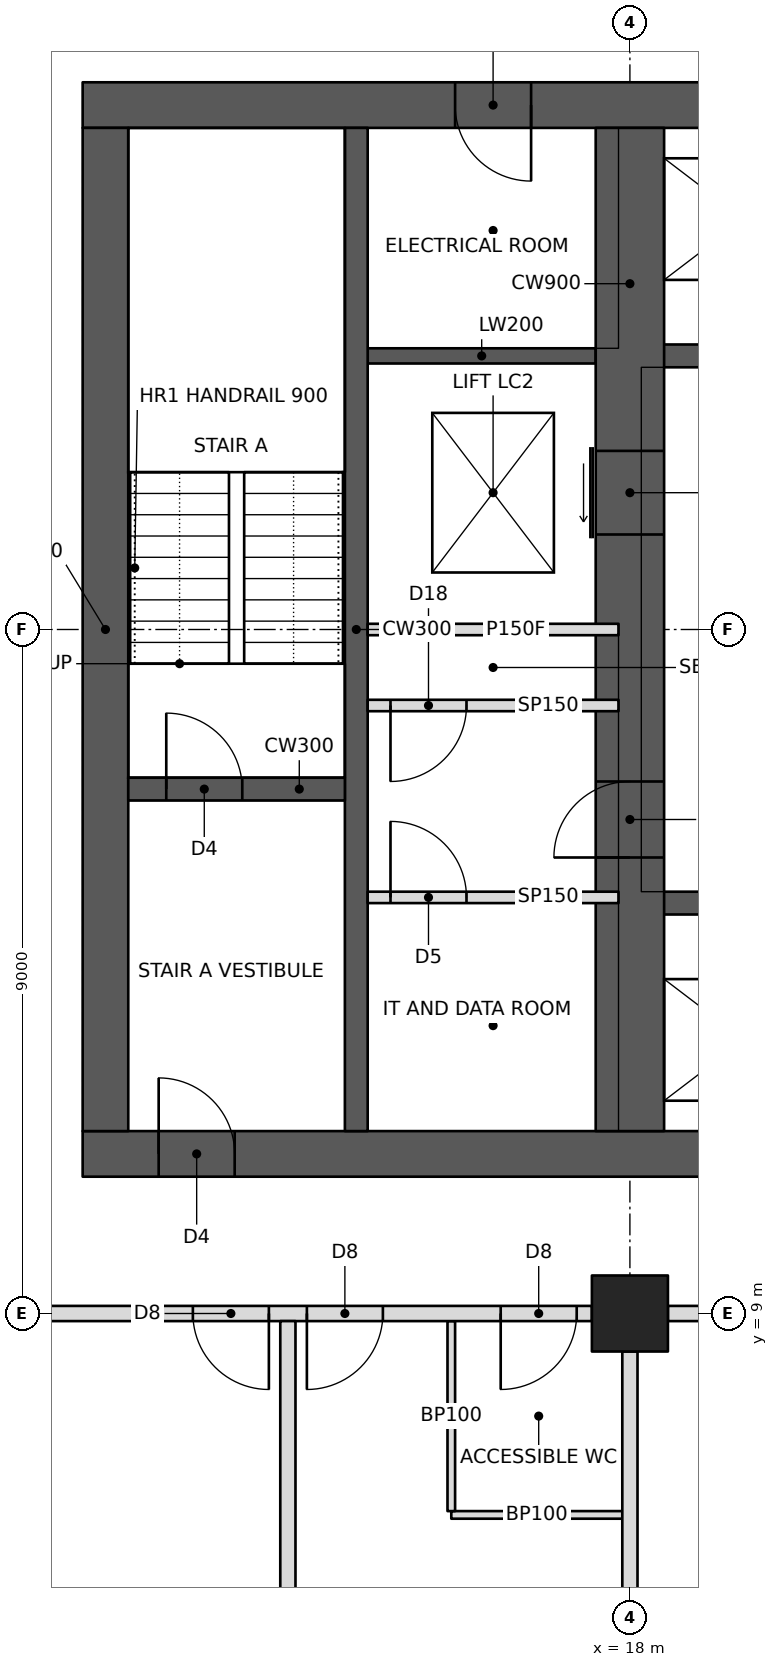
"""IFC4 building model, lengths in metres.
Left out: names, types, materials, properties, quantities, classifications, styles, units other than length and angle.
Written with IfcOpenShell. Run it as: python <this file> out.ifc"""

import sys

from ifc_helpers import new_model, si_unit, direction, frame, frame_2d, origin, origin_2d, place, context, subcontext, project, spatial, rectangle, hollow_rectangle, extrude, element, fill, save


model = new_model("IFC4")
c1 = context("Model", 3, precision=1e-05, world=origin(), true_north=direction((0.0, 1.0)))
c2 = subcontext(c1, "Body", "Model", "MODEL_VIEW")
j1 = project(units=[si_unit("LENGTHUNIT", "METRE"), si_unit("PLANEANGLEUNIT", "RADIAN")], contexts=[c1])
p1 = place(None, origin())
s1 = spatial("IfcSite", under=j1, at=p1, CompositionType="ELEMENT")
p2 = place(p1, origin())
s2 = spatial("IfcBuilding", under=s1, at=p2, CompositionType="ELEMENT")
p3 = place(p2, frame((0.0, 0.0, 160.4)))
s3 = spatial("IfcBuildingStorey", under=s2, at=p3, CompositionType="ELEMENT", Elevation=160.4)
p4 = place(p3, frame((18.0, 9.0, 0.0), z_axis=(0.0, 0.0, 1.0), x_axis=(1.0, 0.0, 0.0)))
e1 = element("IfcColumn", 1, at=p4, inside=s3, PredefinedType="COLUMN", context=c2, shape_type="SweptSolid", body=[
    extrude(hollow_rectangle(XDim=1.0, YDim=1.0, WallThickness=0.1, at=origin_2d()), origin(), (0.0, 0.0, 1.0), 3.4),
])
p5 = place(p3, frame((10.8, 11.1, 0.0), z_axis=(0.0, 0.0, 1.0), x_axis=(1.0, 0.0, 0.0)))
e2 = element("IfcWall", 2, at=p5, inside=s3, PredefinedType="SHEAR", context=c2, shape_type="SweptSolid", body=[
    extrude(rectangle(XDim=23.4, YDim=0.6, at=frame_2d((11.7, 0.0))), origin(), (0.0, 0.0, 1.0), 3.4),
])
p6 = place(p5, frame((1.0, 0.0, 0.0)))
e3 = element("IfcOpeningElement", 3, at=p6, cuts=e2, PredefinedType="OPENING", context=c2, shape_type="SweptSolid", body=[
    extrude(rectangle(XDim=1.0, YDim=2.1, at=frame_2d((0.5, 1.05))), frame((0.0, 0.31, 0.0), z_axis=(0.0, -1.0, 0.0), x_axis=(1.0, 0.0, 0.0)), (0.0, 0.0, 1.0), 0.62),
])
p7 = place(p5, frame((17.2, 0.0, 0.0)))
e4 = element("IfcOpeningElement", 4, at=p7, cuts=e2, PredefinedType="OPENING", context=c2, shape_type="SweptSolid", body=[
    extrude(rectangle(XDim=1.8, YDim=2.1, at=frame_2d((0.9, 1.05))), frame((0.0, 0.31, 0.0), z_axis=(0.0, -1.0, 0.0), x_axis=(1.0, 0.0, 0.0)), (0.0, 0.0, 1.0), 0.62),
])
p8 = place(p3, frame((10.8, 24.9, 0.0), z_axis=(0.0, 0.0, 1.0), x_axis=(1.0, 0.0, 0.0)))
e5 = element("IfcWall", 5, at=p8, inside=s3, PredefinedType="SHEAR", context=c2, shape_type="SweptSolid", body=[
    extrude(rectangle(XDim=23.4, YDim=0.6, at=frame_2d((11.7, 0.0))), origin(), (0.0, 0.0, 1.0), 3.4),
])
p9 = place(p8, frame((17.2, 0.0, 0.0)))
e6 = element("IfcOpeningElement", 6, at=p9, cuts=e5, PredefinedType="OPENING", context=c2, shape_type="SweptSolid", body=[
    extrude(rectangle(XDim=1.8, YDim=2.1, at=frame_2d((0.9, 1.05))), frame((0.0, 0.31, 0.0), z_axis=(0.0, -1.0, 0.0), x_axis=(1.0, 0.0, 0.0)), (0.0, 0.0, 1.0), 0.62),
])
p10 = place(p8, frame((21.1, 0.0, 0.0)))
e7 = element("IfcOpeningElement", 7, at=p10, cuts=e5, PredefinedType="OPENING", context=c2, shape_type="SweptSolid", body=[
    extrude(rectangle(XDim=1.0, YDim=2.1, at=frame_2d((0.5, 1.05))), frame((0.0, 0.31, 0.0), z_axis=(0.0, -1.0, 0.0), x_axis=(1.0, 0.0, 0.0)), (0.0, 0.0, 1.0), 0.62),
])
p11 = place(p8, frame((4.9, 0.0, 0.0)))
e8 = element("IfcOpeningElement", 8, at=p11, cuts=e5, PredefinedType="OPENING", context=c2, shape_type="SweptSolid", body=[
    extrude(rectangle(XDim=1.0, YDim=2.1, at=frame_2d((0.5, 1.05))), frame((0.0, 0.31, 0.0), z_axis=(0.0, -1.0, 0.0), x_axis=(1.0, 0.0, 0.0)), (0.0, 0.0, 1.0), 0.62),
])
p12 = place(p3, frame((11.1, 11.4, 0.0), z_axis=(0.0, 0.0, 1.0), x_axis=(0.0, 1.0, 0.0)))
e9 = element("IfcWall", 9, at=p12, inside=s3, PredefinedType="SHEAR", context=c2, shape_type="SweptSolid", body=[
    extrude(rectangle(XDim=13.2, YDim=0.6, at=frame_2d((6.6, 0.0))), origin(), (0.0, 0.0, 1.0), 3.4),
])
p13 = place(p3, frame((14.4, 11.4, 0.0), z_axis=(0.0, 0.0, 1.0), x_axis=(0.0, 1.0, 0.0)))
e10 = element("IfcWall", 10, at=p13, inside=s3, PredefinedType="SHEAR", context=c2, shape_type="SweptSolid", body=[
    extrude(rectangle(XDim=13.2, YDim=0.3, at=frame_2d((6.6, 0.0))), origin(), (0.0, 0.0, 1.0), 3.4),
])
p14 = place(p3, frame((11.4, 15.9, 0.0), z_axis=(0.0, 0.0, 1.0), x_axis=(1.0, 0.0, 0.0)))
e11 = element("IfcWall", 11, at=p14, inside=s3, PredefinedType="SHEAR", context=c2, shape_type="SweptSolid", body=[
    extrude(rectangle(XDim=2.85, YDim=0.3, at=frame_2d((1.425, 0.0))), origin(), (0.0, 0.0, 1.0), 3.4),
])
p15 = place(p14, frame((0.5, 0.0, 0.0)))
e12 = element("IfcOpeningElement", 12, at=p15, cuts=e11, PredefinedType="OPENING", context=c2, shape_type="SweptSolid", body=[
    extrude(rectangle(XDim=1.0, YDim=2.1, at=frame_2d((0.5, 1.05))), frame((0.0, 0.16, 0.0), z_axis=(0.0, -1.0, 0.0), x_axis=(1.0, 0.0, 0.0)), (0.0, 0.0, 1.0), 0.32),
])
p16 = place(p3, frame((18.0, 11.4, 0.0), z_axis=(0.0, 0.0, 1.0), x_axis=(0.0, 1.0, 0.0)))
e13 = element("IfcWall", 13, at=p16, inside=s3, PredefinedType="SHEAR", context=c2, shape_type="SweptSolid", body=[
    extrude(rectangle(XDim=13.2, YDim=0.9, at=frame_2d((6.6, 0.0))), origin(), (0.0, 0.0, 1.0), 3.4),
])
p17 = place(p16, frame((3.6, 0.0, 0.0)))
e14 = element("IfcOpeningElement", 14, at=p17, cuts=e13, PredefinedType="OPENING", context=c2, shape_type="SweptSolid", body=[
    extrude(rectangle(XDim=1.0, YDim=2.1, at=frame_2d((0.5, 1.05))), frame((0.0, 0.46, 0.0), z_axis=(0.0, -1.0, 0.0), x_axis=(1.0, 0.0, 0.0)), (0.0, 0.0, 1.0), 0.92),
])
p18 = place(p16, frame((7.85, 0.0, 0.0)))
e15 = element("IfcOpeningElement", 15, at=p18, cuts=e13, PredefinedType="OPENING", context=c2, shape_type="SweptSolid", body=[
    extrude(rectangle(XDim=1.1, YDim=2.1, at=frame_2d((0.55, 1.05))), frame((0.0, 0.46, 0.0), z_axis=(0.0, -1.0, 0.0), x_axis=(1.0, 0.0, 0.0)), (0.0, 0.0, 1.0), 0.92),
])
p19 = place(p3, frame((14.55, 18.0, 0.0), z_axis=(0.0, 0.0, 1.0), x_axis=(1.0, 0.0, 0.0)))
e16 = element("IfcWall", 16, at=p19, inside=s3, PredefinedType="PARTITIONING", context=c2, shape_type="SweptSolid", body=[
    extrude(rectangle(XDim=3.3, YDim=0.15, at=frame_2d((1.65, 0.0))), origin(), (0.0, 0.0, 1.0), 3.2),
])
p20 = place(p3, frame((18.15, 14.4, 0.0), z_axis=(0.0, 0.0, 1.0), x_axis=(1.0, 0.0, 0.0)))
e17 = element("IfcWall", 17, at=p20, inside=s3, PredefinedType="SHEAR", context=c2, shape_type="SweptSolid", body=[
    extrude(rectangle(XDim=9.0, YDim=0.3, at=frame_2d((4.5, 0.0))), origin(), (0.0, 0.0, 1.0), 3.4),
])
p21 = place(p20, frame((0.8, 0.0, 0.0)))
e18 = element("IfcOpeningElement", 18, at=p21, cuts=e17, PredefinedType="OPENING", context=c2, shape_type="SweptSolid", body=[
    extrude(rectangle(XDim=1.1, YDim=2.1, at=frame_2d((0.55, 1.05))), frame((0.0, 0.16, 0.0), z_axis=(0.0, -1.0, 0.0), x_axis=(1.0, 0.0, 0.0)), (0.0, 0.0, 1.0), 0.32),
])
p22 = place(p20, frame((6.75, 0.0, 0.0)))
e19 = element("IfcOpeningElement", 19, at=p22, cuts=e17, PredefinedType="OPENING", context=c2, shape_type="SweptSolid", body=[
    extrude(rectangle(XDim=1.2, YDim=2.1, at=frame_2d((0.6, 1.05))), frame((0.0, 0.16, 0.0), z_axis=(0.0, -1.0, 0.0), x_axis=(1.0, 0.0, 0.0)), (0.0, 0.0, 1.0), 0.32),
])
p23 = place(p20, frame((3.8, 0.0, 0.0)))
e20 = element("IfcOpeningElement", 20, at=p23, cuts=e17, PredefinedType="OPENING", context=c2, shape_type="SweptSolid", body=[
    extrude(rectangle(XDim=1.1, YDim=2.1, at=frame_2d((0.55, 1.05))), frame((0.0, 0.16, 0.0), z_axis=(0.0, -1.0, 0.0), x_axis=(1.0, 0.0, 0.0)), (0.0, 0.0, 1.0), 0.32),
])
p24 = place(p3, frame((18.15, 21.6, 0.0), z_axis=(0.0, 0.0, 1.0), x_axis=(1.0, 0.0, 0.0)))
e21 = element("IfcWall", 21, at=p24, inside=s3, PredefinedType="SHEAR", context=c2, shape_type="SweptSolid", body=[
    extrude(rectangle(XDim=9.0, YDim=0.3, at=frame_2d((4.5, 0.0))), origin(), (0.0, 0.0, 1.0), 3.4),
])
p25 = place(p24, frame((0.8, 0.0, 0.0)))
e22 = element("IfcOpeningElement", 22, at=p25, cuts=e21, PredefinedType="OPENING", context=c2, shape_type="SweptSolid", body=[
    extrude(rectangle(XDim=1.1, YDim=2.1, at=frame_2d((0.55, 1.05))), frame((0.0, 0.16, 0.0), z_axis=(0.0, -1.0, 0.0), x_axis=(1.0, 0.0, 0.0)), (0.0, 0.0, 1.0), 0.32),
])
p26 = place(p24, frame((3.8, 0.0, 0.0)))
e23 = element("IfcOpeningElement", 23, at=p26, cuts=e21, PredefinedType="OPENING", context=c2, shape_type="SweptSolid", body=[
    extrude(rectangle(XDim=1.1, YDim=2.1, at=frame_2d((0.55, 1.05))), frame((0.0, 0.16, 0.0), z_axis=(0.0, -1.0, 0.0), x_axis=(1.0, 0.0, 0.0)), (0.0, 0.0, 1.0), 0.32),
])
p27 = place(p24, frame((6.75, 0.0, 0.0)))
e24 = element("IfcOpeningElement", 24, at=p27, cuts=e21, PredefinedType="OPENING", context=c2, shape_type="SweptSolid", body=[
    extrude(rectangle(XDim=1.2, YDim=2.1, at=frame_2d((0.6, 1.05))), frame((0.0, 0.16, 0.0), z_axis=(0.0, -1.0, 0.0), x_axis=(1.0, 0.0, 0.0)), (0.0, 0.0, 1.0), 0.32),
])
p28 = place(p3, frame((14.55, 21.6, 0.0), z_axis=(0.0, 0.0, 1.0), x_axis=(1.0, 0.0, 0.0)))
e25 = element("IfcWall", 25, at=p28, inside=s3, PredefinedType="SHEAR", context=c2, shape_type="SweptSolid", body=[
    extrude(rectangle(XDim=3.0, YDim=0.2, at=frame_2d((1.5, 0.0))), origin(), (0.0, 0.0, 1.0), 3.4),
])
p29 = place(p3, frame((9.5, 9.0, 0.0), z_axis=(0.0, 0.0, 1.0), x_axis=(1.0, 0.0, 0.0)))
e26 = element("IfcWall", 26, at=p29, inside=s3, PredefinedType="PARTITIONING", context=c2, shape_type="SweptSolid", body=[
    extrude(rectangle(XDim=8.0, YDim=0.2, at=frame_2d((4.0, 0.0))), origin(), (0.0, 0.0, 1.0), 2.405),
])
p30 = place(p29, frame((2.75, 0.0, 0.0)))
e27 = element("IfcOpeningElement", 27, at=p30, cuts=e26, PredefinedType="OPENING", context=c2, shape_type="SweptSolid", body=[
    extrude(rectangle(XDim=1.0, YDim=2.1, at=frame_2d((0.5, 1.05))), frame((0.0, 0.11, 0.0), z_axis=(0.0, -1.0, 0.0), x_axis=(1.0, 0.0, 0.0)), (0.0, 0.0, 1.0), 0.22),
])
p31 = place(p29, frame((6.8, 0.0, 0.0)))
e28 = element("IfcOpeningElement", 28, at=p31, cuts=e26, PredefinedType="OPENING", context=c2, shape_type="SweptSolid", body=[
    extrude(rectangle(XDim=1.0, YDim=2.1, at=frame_2d((0.5, 1.05))), frame((0.0, 0.11, 0.0), z_axis=(0.0, -1.0, 0.0), x_axis=(1.0, 0.0, 0.0)), (0.0, 0.0, 1.0), 0.22),
])
p32 = place(p29, frame((4.25, 0.0, 0.0)))
e29 = element("IfcOpeningElement", 29, at=p32, cuts=e26, PredefinedType="OPENING", context=c2, shape_type="SweptSolid", body=[
    extrude(rectangle(XDim=1.0, YDim=2.1, at=frame_2d((0.5, 1.05))), frame((0.0, 0.11, 0.0), z_axis=(0.0, -1.0, 0.0), x_axis=(1.0, 0.0, 0.0)), (0.0, 0.0, 1.0), 0.22),
])
p33 = place(p3, frame((18.5, 9.0, 0.0), z_axis=(0.0, 0.0, 1.0), x_axis=(1.0, 0.0, 0.0)))
e30 = element("IfcWall", 30, at=p33, inside=s3, PredefinedType="PARTITIONING", context=c2, shape_type="SweptSolid", body=[
    extrude(rectangle(XDim=2.85, YDim=0.2, at=frame_2d((1.425, 0.0))), origin(), (0.0, 0.0, 1.0), 2.405),
])
p34 = place(p3, frame((18.0, 8.5, 0.0), z_axis=(0.0, 0.0, 1.0), x_axis=(0.0, -1.0, 0.0)))
e31 = element("IfcWall", 31, at=p34, inside=s3, PredefinedType="PARTITIONING", context=c2, shape_type="SweptSolid", body=[
    extrude(rectangle(XDim=7.5, YDim=0.2, at=frame_2d((3.75, 0.0))), origin(), (0.0, 0.0, 1.0), 2.405),
])
p35 = place(p3, frame((13.5, 8.9, 0.0), z_axis=(0.0, 0.0, 1.0), x_axis=(0.0, -1.0, 0.0)))
e32 = element("IfcWall", 32, at=p35, inside=s3, PredefinedType="PARTITIONING", context=c2, shape_type="SweptSolid", body=[
    extrude(rectangle(XDim=7.9, YDim=0.2, at=frame_2d((3.95, 0.0))), origin(), (0.0, 0.0, 1.0), 2.404),
])
p36 = place(p3, frame((15.65, 6.35, 0.0), z_axis=(0.0, 0.0, 1.0), x_axis=(1.0, 0.0, 0.0)))
e33 = element("IfcWall", 33, at=p36, inside=s3, PredefinedType="PARTITIONING", context=c2, shape_type="SweptSolid", body=[
    extrude(rectangle(XDim=2.25, YDim=0.1, at=frame_2d((1.125, 0.0))), origin(), (0.0, 0.0, 1.0), 2.404),
])
p37 = place(p3, frame((15.65, 8.9, 0.0), z_axis=(0.0, 0.0, 1.0), x_axis=(0.0, -1.0, 0.0)))
e34 = element("IfcWall", 34, at=p37, inside=s3, PredefinedType="PARTITIONING", context=c2, shape_type="SweptSolid", body=[
    extrude(rectangle(XDim=2.5, YDim=0.1, at=frame_2d((1.25, 0.0))), origin(), (0.0, 0.0, 1.0), 2.404),
])
p38 = place(p3, frame((14.55, 17.0, 0.0), z_axis=(0.0, 0.0, 1.0), x_axis=(1.0, 0.0, 0.0)))
e35 = element("IfcWall", 35, at=p38, inside=s3, PredefinedType="PARTITIONING", context=c2, shape_type="SweptSolid", body=[
    extrude(rectangle(XDim=3.3, YDim=0.15, at=frame_2d((1.65, 0.0))), origin(), (0.0, 0.0, 1.0), 3.2),
])
p39 = place(p38, frame((0.3, 0.0, 0.0)))
e36 = element("IfcOpeningElement", 36, at=p39, cuts=e35, PredefinedType="OPENING", context=c2, shape_type="SweptSolid", body=[
    extrude(rectangle(XDim=1.0, YDim=2.1, at=frame_2d((0.5, 1.05))), frame((0.0, 0.085, 0.0), z_axis=(0.0, -1.0, 0.0), x_axis=(1.0, 0.0, 0.0)), (0.0, 0.0, 1.0), 0.17),
])
p40 = place(p3, frame((14.55, 14.475, 0.0), z_axis=(0.0, 0.0, 1.0), x_axis=(1.0, 0.0, 0.0)))
e37 = element("IfcWall", 37, at=p40, inside=s3, PredefinedType="PARTITIONING", context=c2, shape_type="SweptSolid", body=[
    extrude(rectangle(XDim=3.3, YDim=0.15, at=frame_2d((1.65, 0.0))), origin(), (0.0, 0.0, 1.0), 3.2),
])
p41 = place(p40, frame((0.3, 0.0, 0.0)))
e38 = element("IfcOpeningElement", 38, at=p41, cuts=e37, PredefinedType="OPENING", context=c2, shape_type="SweptSolid", body=[
    extrude(rectangle(XDim=1.0, YDim=2.1, at=frame_2d((0.5, 1.05))), frame((0.0, 0.085, 0.0), z_axis=(0.0, -1.0, 0.0), x_axis=(1.0, 0.0, 0.0)), (0.0, 0.0, 1.0), 0.17),
])
p42 = place(p30, frame((1.0, 0.0, 0.0), z_axis=(0.0, 0.0, 1.0), x_axis=(-1.0, 0.0, 0.0)))
e39 = element("IfcDoor", 39, at=p42, inside=s3, OperationType="SINGLE_SWING_LEFT", PredefinedType="DOOR", context=c2, shape_type="SweptSolid", body=[
    extrude(rectangle(XDim=1.0, YDim=2.1, at=frame_2d((0.5, 1.05))), frame((0.0, 0.025, 0.0), z_axis=(0.0, -1.0, 0.0), x_axis=(1.0, 0.0, 0.0)), (0.0, 0.0, 1.0), 0.05),
])
fill(e27, e39)
p43 = place(p31, frame((1.0, 0.0, 0.0), z_axis=(0.0, 0.0, 1.0), x_axis=(-1.0, 0.0, 0.0)))
e40 = element("IfcDoor", 40, at=p43, inside=s3, OperationType="SINGLE_SWING_RIGHT", PredefinedType="DOOR", context=c2, shape_type="SweptSolid", body=[
    extrude(rectangle(XDim=1.0, YDim=2.1, at=frame_2d((0.5, 1.05))), frame((0.0, 0.025, 0.0), z_axis=(0.0, -1.0, 0.0), x_axis=(1.0, 0.0, 0.0)), (0.0, 0.0, 1.0), 0.05),
])
fill(e28, e40)
p44 = place(p32, frame((1.0, 0.0, 0.0), z_axis=(0.0, 0.0, 1.0), x_axis=(-1.0, 0.0, 0.0)))
e41 = element("IfcDoor", 41, at=p44, inside=s3, OperationType="SINGLE_SWING_RIGHT", PredefinedType="DOOR", context=c2, shape_type="SweptSolid", body=[
    extrude(rectangle(XDim=1.0, YDim=2.1, at=frame_2d((0.5, 1.05))), frame((0.0, 0.025, 0.0), z_axis=(0.0, -1.0, 0.0), x_axis=(1.0, 0.0, 0.0)), (0.0, 0.0, 1.0), 0.05),
])
fill(e29, e41)
p45 = place(p39, frame((1.0, 0.0, 0.0), z_axis=(0.0, 0.0, 1.0), x_axis=(-1.0, 0.0, 0.0)))
e42 = element("IfcDoor", 42, at=p45, inside=s3, OperationType="SINGLE_SWING_RIGHT", PredefinedType="DOOR", context=c2, shape_type="SweptSolid", body=[
    extrude(rectangle(XDim=1.0, YDim=2.1, at=frame_2d((0.5, 1.05))), frame((0.0, 0.025, 0.0), z_axis=(0.0, -1.0, 0.0), x_axis=(1.0, 0.0, 0.0)), (0.0, 0.0, 1.0), 0.05),
])
fill(e36, e42)
p46 = place(p41, origin())
e43 = element("IfcDoor", 43, at=p46, inside=s3, OperationType="SINGLE_SWING_LEFT", PredefinedType="DOOR", context=c2, shape_type="SweptSolid", body=[
    extrude(rectangle(XDim=1.0, YDim=2.1, at=frame_2d((0.5, 1.05))), frame((0.0, 0.025, 0.0), z_axis=(0.0, -1.0, 0.0), x_axis=(1.0, 0.0, 0.0)), (0.0, 0.0, 1.0), 0.05),
])
fill(e38, e43)
p47 = place(p6, origin())
e44 = element("IfcDoor", 44, at=p47, inside=s3, OperationType="SINGLE_SWING_LEFT", PredefinedType="DOOR", context=c2, shape_type="SweptSolid", body=[
    extrude(rectangle(XDim=1.0, YDim=2.1, at=frame_2d((0.5, 1.05))), frame((0.0, 0.025, 0.0), z_axis=(0.0, -1.0, 0.0), x_axis=(1.0, 0.0, 0.0)), (0.0, 0.0, 1.0), 0.05),
])
fill(e3, e44)
p48 = place(p15, origin())
e45 = element("IfcDoor", 45, at=p48, inside=s3, OperationType="SINGLE_SWING_LEFT", PredefinedType="DOOR", context=c2, shape_type="SweptSolid", body=[
    extrude(rectangle(XDim=1.0, YDim=2.1, at=frame_2d((0.5, 1.05))), frame((0.0, 0.025, 0.0), z_axis=(0.0, -1.0, 0.0), x_axis=(1.0, 0.0, 0.0)), (0.0, 0.0, 1.0), 0.05),
])
fill(e12, e45)
p49 = place(p17, origin())
e46 = element("IfcDoor", 46, at=p49, inside=s3, OperationType="SINGLE_SWING_LEFT", PredefinedType="DOOR", context=c2, shape_type="SweptSolid", body=[
    extrude(rectangle(XDim=1.0, YDim=2.1, at=frame_2d((0.5, 1.05))), frame((0.0, 0.025, 0.0), z_axis=(0.0, -1.0, 0.0), x_axis=(1.0, 0.0, 0.0)), (0.0, 0.0, 1.0), 0.05),
])
fill(e14, e46)
p50 = place(p11, frame((1.0, 0.0, 0.0), z_axis=(0.0, 0.0, 1.0), x_axis=(-1.0, 0.0, 0.0)))
e47 = element("IfcDoor", 47, at=p50, inside=s3, OperationType="SINGLE_SWING_LEFT", PredefinedType="DOOR", context=c2, shape_type="SweptSolid", body=[
    extrude(rectangle(XDim=1.0, YDim=2.1, at=frame_2d((0.5, 1.05))), frame((0.0, 0.025, 0.0), z_axis=(0.0, -1.0, 0.0), x_axis=(1.0, 0.0, 0.0)), (0.0, 0.0, 1.0), 0.05),
])
fill(e8, e47)
p51 = place(p18, origin())
e48 = element("IfcDoor", 48, at=p51, inside=s3, OperationType="SLIDING_TO_LEFT", PredefinedType="DOOR", context=c2, shape_type="SweptSolid", body=[
    extrude(rectangle(XDim=1.1, YDim=2.1, at=frame_2d((0.55, 1.05))), frame((0.0, 0.025, 0.0), z_axis=(0.0, -1.0, 0.0), x_axis=(1.0, 0.0, 0.0)), (0.0, 0.0, 1.0), 0.05),
])
fill(e15, e48)
save(model, sys.argv[1])
